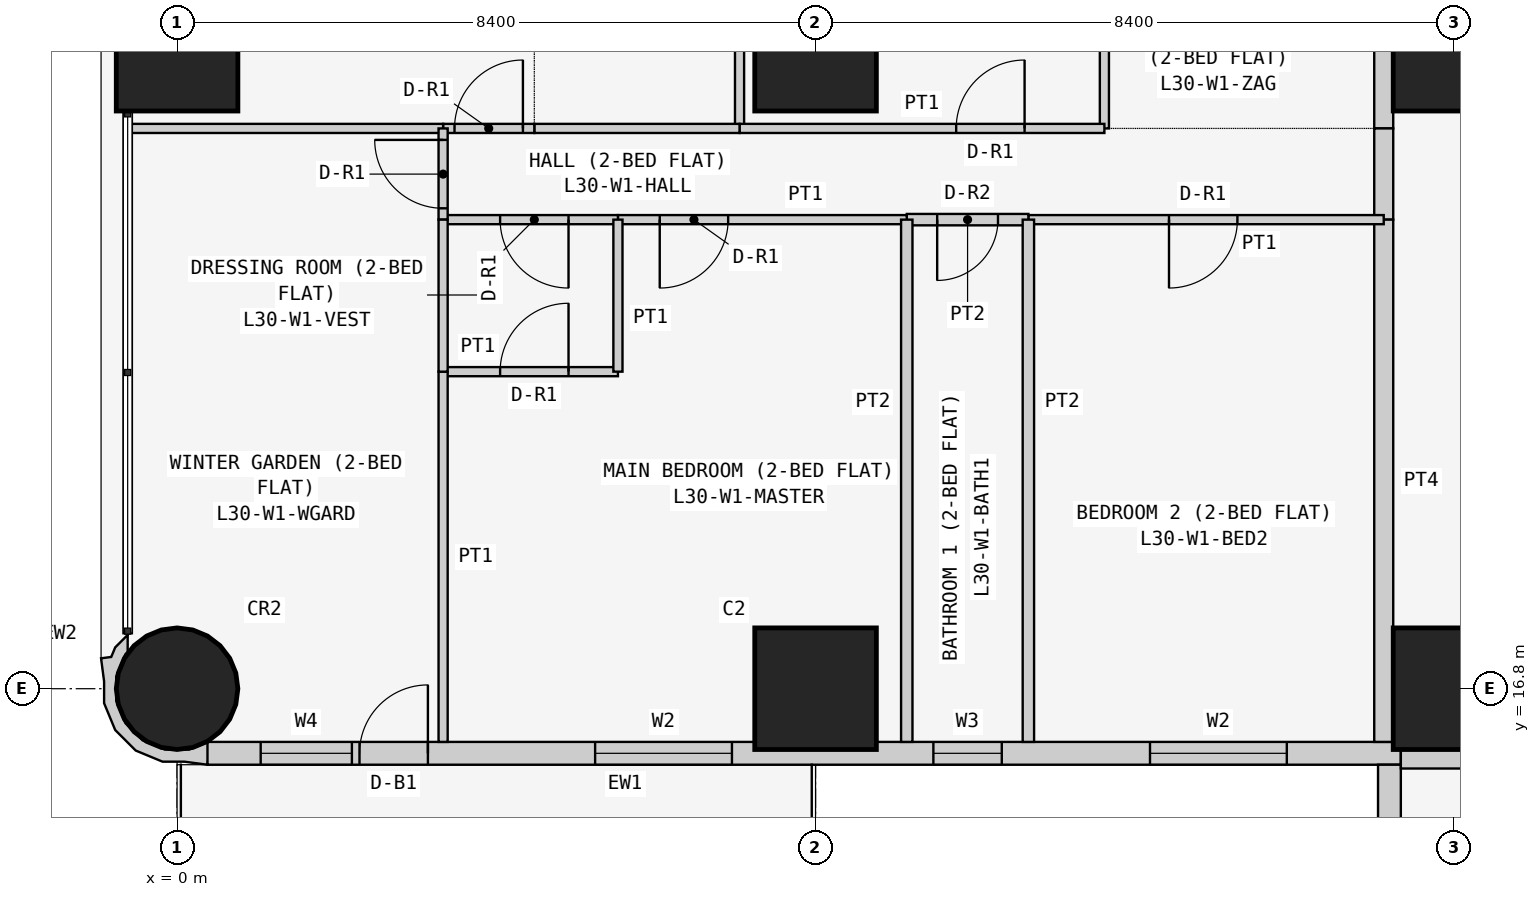
"""IFC4 building model, lengths in metres.
Left out: names, types, materials, properties, quantities, classifications, styles, units other than length and angle.
Written with IfcOpenShell. Run it as: python <this file> out.ifc"""

import sys

from ifc_helpers import new_model, si_unit, direction, frame, frame_2d, origin, origin_2d, place, context, subcontext, project, spatial, polyline, rectangle, circle, outline, extrude, element, fill, save


model = new_model("IFC4")
c1 = context("Model", 3, precision=1e-05, world=origin(), true_north=direction((0.0, 1.0)))
c2 = subcontext(c1, "Body", "Model", "MODEL_VIEW")
j1 = project(units=[si_unit("LENGTHUNIT", "METRE"), si_unit("PLANEANGLEUNIT", "RADIAN")], contexts=[c1])
p1 = place(None, origin())
s1 = spatial("IfcSite", under=j1, at=p1, CompositionType="ELEMENT")
p2 = place(p1, origin())
s2 = spatial("IfcBuilding", under=s1, at=p2, CompositionType="ELEMENT")
p3 = place(p2, frame((0.0, 0.0, 119.7)))
s3 = spatial("IfcBuildingStorey", under=s2, at=p3, CompositionType="ELEMENT", Elevation=119.7)
p4 = place(p3, frame((0.0, 16.8, 0.0), z_axis=(0.0, 0.0, 1.0), x_axis=(1.0, 0.0, 0.0)))
e1 = element("IfcColumn", 1, at=p4, inside=s3, PredefinedType="COLUMN", context=c2, shape_type="SweptSolid", body=[
    extrude(circle(Radius=0.8, at=origin_2d()), origin(), (0.0, 0.0, 1.0), 3.6),
])
for number, where, z_axis, x_axis in (
    (2, (0.0, 25.2, 0.0), (0.0, 0.0, 1.0), (1.0, 0.0, 0.0)),
    (3, (8.4, 16.8, 0.0), (0.0, 0.0, 1.0), (1.0, 0.0, 0.0)),
    (4, (8.4, 25.2, 0.0), (0.0, 0.0, 1.0), (1.0, 0.0, 0.0)),
    (5, (16.8, 16.8, 0.0), (0.0, 0.0, 1.0), (1.0, 0.0, 0.0)),
    (6, (16.8, 25.2, 0.0), (0.0, 0.0, 1.0), (1.0, 0.0, 0.0)),
):
    element("IfcColumn", number, at=place(p3, frame(where, z_axis=z_axis, x_axis=x_axis)), inside=s3, PredefinedType="COLUMN", context=c2, shape_type="SweptSolid", body=[
        extrude(rectangle(XDim=1.6, YDim=1.6, at=origin_2d()), origin(), (0.0, 0.0, 1.0), 3.6),
    ])
p5 = place(p3, frame((0.4, 15.95, 0.0), z_axis=(0.0, 0.0, 1.0), x_axis=(1.0, 0.0, 0.0)))
e7 = element("IfcWall", 7, at=p5, inside=s3, PredefinedType="SOLIDWALL", context=c2, shape_type="SweptSolid", body=[
    extrude(rectangle(XDim=15.7, YDim=0.3, at=frame_2d((7.85, 0.0))), origin(), (0.0, 0.0, 1.0), 3.45),
])
p6 = place(p5, frame((12.4, 0.0, 0.9)))
e8 = element("IfcOpeningElement", 8, at=p6, cuts=e7, PredefinedType="OPENING", context=c2, shape_type="SweptSolid", body=[
    extrude(rectangle(XDim=1.8, YDim=1.5, at=frame_2d((0.9, 0.75))), frame((0.0, 0.16, 0.0), z_axis=(0.0, -1.0, 0.0), x_axis=(1.0, 0.0, 0.0)), (0.0, 0.0, 1.0), 0.32),
])
p7 = place(p5, frame((9.55, 0.0, 1.5)))
e9 = element("IfcOpeningElement", 9, at=p7, cuts=e7, PredefinedType="OPENING", context=c2, shape_type="SweptSolid", body=[
    extrude(rectangle(XDim=0.9, YDim=0.7, at=frame_2d((0.45, 0.35))), frame((0.0, 0.16, 0.0), z_axis=(0.0, -1.0, 0.0), x_axis=(1.0, 0.0, 0.0)), (0.0, 0.0, 1.0), 0.32),
])
p8 = place(p5, frame((5.1, 0.0, 0.9)))
e10 = element("IfcOpeningElement", 10, at=p8, cuts=e7, PredefinedType="OPENING", context=c2, shape_type="SweptSolid", body=[
    extrude(rectangle(XDim=1.8, YDim=1.5, at=frame_2d((0.9, 0.75))), frame((0.0, 0.16, 0.0), z_axis=(0.0, -1.0, 0.0), x_axis=(1.0, 0.0, 0.0)), (0.0, 0.0, 1.0), 0.32),
])
p9 = place(p5, frame((2.0, 0.0, 0.0)))
e11 = element("IfcOpeningElement", 11, at=p9, cuts=e7, PredefinedType="OPENING", context=c2, shape_type="SweptSolid", body=[
    extrude(rectangle(XDim=0.9, YDim=2.4, at=frame_2d((0.45, 1.2))), frame((0.0, 0.16, 0.0), z_axis=(0.0, -1.0, 0.0), x_axis=(1.0, 0.0, 0.0)), (0.0, 0.0, 1.0), 0.32),
])
p10 = place(p5, frame((0.7, 0.0, 0.9)))
e12 = element("IfcOpeningElement", 12, at=p10, cuts=e7, PredefinedType="OPENING", context=c2, shape_type="SweptSolid", body=[
    extrude(rectangle(XDim=1.2, YDim=1.5, at=frame_2d((0.6, 0.75))), frame((0.0, 0.16, 0.0), z_axis=(0.0, -1.0, 0.0), x_axis=(1.0, 0.0, 0.0)), (0.0, 0.0, 1.0), 0.32),
])
p11 = place(p3, frame((15.95, 15.8, 0.0), z_axis=(0.0, 0.0, 1.0), x_axis=(0.0, -1.0, 0.0)))
e13 = element("IfcWall", 13, at=p11, inside=s3, PredefinedType="SOLIDWALL", context=c2, shape_type="SweptSolid", body=[
    extrude(rectangle(XDim=7.0, YDim=0.3, at=frame_2d((3.5, 0.0))), origin(), (0.0, 0.0, 1.0), 3.45),
])
p12 = place(p11, frame((1.5, 0.0, 0.9)))
e14 = element("IfcOpeningElement", 14, at=p12, cuts=e13, PredefinedType="OPENING", context=c2, shape_type="SweptSolid", body=[
    extrude(rectangle(XDim=2.4, YDim=1.5, at=frame_2d((1.2, 0.75))), frame((0.0, 0.16, 0.0), z_axis=(0.0, -1.0, 0.0), x_axis=(1.0, 0.0, 0.0)), (0.0, 0.0, 1.0), 0.32),
])
p13 = place(p11, frame((5.05, 0.0, 0.9)))
e15 = element("IfcOpeningElement", 15, at=p13, cuts=e13, PredefinedType="OPENING", context=c2, shape_type="SweptSolid", body=[
    extrude(rectangle(XDim=1.2, YDim=1.5, at=frame_2d((0.6, 0.75))), frame((0.0, 0.16, 0.0), z_axis=(0.0, -1.0, 0.0), x_axis=(1.0, 0.0, 0.0)), (0.0, 0.0, 1.0), 0.32),
])
p14 = place(p3, frame((-0.595, 17.448, 0.0), z_axis=(0.0, 0.0, 1.0), x_axis=(-0.93923434088, -0.343276641956, 0.0)))
e16 = element("IfcWall", 16, at=p14, inside=s3, PredefinedType="SOLIDWALL", context=c2, shape_type="SweptSolid", body=[
    extrude(outline(polyline([(-0.369, 1.89), (-0.509, 1.621), (-0.491, 1.614), (-0.479, 1.609), (-0.211, 1.62), (0.088, 1.511), (0.323, 1.295), (0.457, 1.006), (0.47, 0.688), (0.361, 0.389), (0.146, 0.154), (0.108, 0.137), (0.031, -0.075), (0.241, 0.023), (0.334, 0.124), (0.465, 0.094), (0.532, 0.393), (0.631, 0.663), (0.614, 1.045), (0.453, 1.391), (0.172, 1.649), (-0.098, 1.748), (-0.369, 1.89)])), origin(), (0.0, 0.0, 1.0), 3.45),
])
p15 = place(p3, frame((22.971, 15.875, 0.0), z_axis=(0.0, 0.0, 1.0), x_axis=(-1.0, 0.0, 0.0)))
e17 = element("IfcWall", 17, at=p15, inside=s3, PredefinedType="PARTITIONING", context=c2, shape_type="SweptSolid", body=[
    extrude(rectangle(XDim=6.871, YDim=0.25, at=frame_2d((3.436, 0.0))), origin(), (0.0, 0.0, 1.0), 3.45),
])
p16 = place(p3, frame((15.875, 24.171, 0.0), z_axis=(0.0, 0.0, 1.0), x_axis=(0.0, 1.0, 0.0)))
e18 = element("IfcWall", 18, at=p16, inside=s3, PredefinedType="PARTITIONING", context=c2, shape_type="SweptSolid", body=[
    extrude(rectangle(XDim=5.229, YDim=0.25, at=frame_2d((2.615, 0.0))), origin(), (0.0, 0.0, 1.0), 3.45),
])
p17 = place(p16, frame((2.129, 0.0, 0.0)))
e19 = element("IfcOpeningElement", 19, at=p17, cuts=e18, PredefinedType="OPENING", context=c2, shape_type="SweptSolid", body=[
    extrude(rectangle(XDim=1.0, YDim=2.1, at=frame_2d((0.5, 1.05))), frame((0.0, 0.135, 0.0), z_axis=(0.0, -1.0, 0.0), x_axis=(1.0, 0.0, 0.0)), (0.0, 0.0, 1.0), 0.27),
])
p18 = place(p3, frame((15.875, 22.971, 0.0), z_axis=(0.0, 0.0, 1.0), x_axis=(0.0, 1.0, 0.0)))
e20 = element("IfcWall", 20, at=p18, inside=s3, PredefinedType="PARTITIONING", context=c2, shape_type="SweptSolid", body=[
    extrude(rectangle(XDim=1.2, YDim=0.25, at=frame_2d((0.6, 0.0))), origin(), (0.0, 0.0, 1.0), 3.45),
])
p19 = place(p3, frame((15.875, 16.1, 0.0), z_axis=(0.0, 0.0, 1.0), x_axis=(0.0, 1.0, 0.0)))
e21 = element("IfcWall", 21, at=p19, inside=s3, PredefinedType="PARTITIONING", context=c2, shape_type="SweptSolid", body=[
    extrude(rectangle(XDim=6.871, YDim=0.25, at=frame_2d((3.436, 0.0))), origin(), (0.0, 0.0, 1.0), 3.45),
])
for number, where, z_axis, x_axis in (
    (22, (12.2, 29.4, 0.0), (0.0, 0.0, 1.0), (0.0, -1.0, 0.0)),
    (23, (7.4, 29.4, 0.0), (0.0, 0.0, 1.0), (0.0, -1.0, 0.0)),
):
    element("IfcWall", number, at=place(p3, frame(where, z_axis=z_axis, x_axis=x_axis)), inside=s3, PredefinedType="PARTITIONING", context=c2, shape_type="SweptSolid", body=[
        extrude(rectangle(XDim=5.229, YDim=0.12, at=frame_2d((2.615, 0.0))), origin(), (0.0, 0.0, 1.0), 3.45),
    ])
p20 = place(p3, frame((7.4, 24.171, 0.0), z_axis=(0.0, 0.0, 1.0), x_axis=(1.0, 0.0, 0.0)))
e24 = element("IfcWall", 24, at=p20, inside=s3, PredefinedType="PARTITIONING", context=c2, shape_type="SweptSolid", body=[
    extrude(rectangle(XDim=4.8, YDim=0.12, at=frame_2d((2.4, 0.0))), origin(), (0.0, 0.0, 1.0), 3.45),
])
p21 = place(p20, frame((2.85, 0.0, 0.0)))
e25 = element("IfcOpeningElement", 25, at=p21, cuts=e24, PredefinedType="OPENING", context=c2, shape_type="SweptSolid", body=[
    extrude(rectangle(XDim=0.9, YDim=2.1, at=frame_2d((0.45, 1.05))), frame((0.0, 0.07, 0.0), z_axis=(0.0, -1.0, 0.0), x_axis=(1.0, 0.0, 0.0)), (0.0, 0.0, 1.0), 0.14),
])
p22 = place(p3, frame((4.7, 24.171, 0.0), z_axis=(0.0, 0.0, 1.0), x_axis=(1.0, 0.0, 0.0)))
e26 = element("IfcWall", 26, at=p22, inside=s3, PredefinedType="PARTITIONING", context=c2, shape_type="SweptSolid", body=[
    extrude(rectangle(XDim=2.7, YDim=0.12, at=frame_2d((1.35, 0.0))), origin(), (0.0, 0.0, 1.0), 3.45),
])
p23 = place(p3, frame((3.5, 24.171, 0.0), z_axis=(0.0, 0.0, 1.0), x_axis=(1.0, 0.0, 0.0)))
e27 = element("IfcWall", 27, at=p23, inside=s3, PredefinedType="PARTITIONING", context=c2, shape_type="SweptSolid", body=[
    extrude(rectangle(XDim=1.2, YDim=0.12, at=frame_2d((0.6, 0.0))), origin(), (0.0, 0.0, 1.0), 3.45),
])
p24 = place(p23, frame((0.15, 0.0, 0.0)))
e28 = element("IfcOpeningElement", 28, at=p24, cuts=e27, PredefinedType="OPENING", context=c2, shape_type="SweptSolid", body=[
    extrude(rectangle(XDim=0.9, YDim=2.1, at=frame_2d((0.45, 1.05))), frame((0.0, 0.07, 0.0), z_axis=(0.0, -1.0, 0.0), x_axis=(1.0, 0.0, 0.0)), (0.0, 0.0, 1.0), 0.14),
])
p25 = place(p3, frame((-0.65, 24.171, 0.0), z_axis=(0.0, 0.0, 1.0), x_axis=(1.0, 0.0, 0.0)))
e29 = element("IfcWall", 29, at=p25, inside=s3, PredefinedType="PARTITIONING", context=c2, shape_type="SweptSolid", body=[
    extrude(rectangle(XDim=4.15, YDim=0.12, at=frame_2d((2.075, 0.0))), origin(), (0.0, 0.0, 1.0), 3.45),
])
p26 = place(p3, frame((11.2, 22.971, 0.0), z_axis=(0.0, 0.0, 1.0), x_axis=(1.0, 0.0, 0.0)))
e30 = element("IfcWall", 30, at=p26, inside=s3, PredefinedType="PARTITIONING", context=c2, shape_type="SweptSolid", body=[
    extrude(rectangle(XDim=4.675, YDim=0.12, at=frame_2d((2.337, 0.0))), origin(), (0.0, 0.0, 1.0), 3.45),
])
p27 = place(p26, frame((1.85, 0.0, 0.0)))
e31 = element("IfcOpeningElement", 31, at=p27, cuts=e30, PredefinedType="OPENING", context=c2, shape_type="SweptSolid", body=[
    extrude(rectangle(XDim=0.9, YDim=2.1, at=frame_2d((0.45, 1.05))), frame((0.0, 0.07, 0.0), z_axis=(0.0, -1.0, 0.0), x_axis=(1.0, 0.0, 0.0)), (0.0, 0.0, 1.0), 0.14),
])
p28 = place(p3, frame((9.6, 22.971, 0.0), z_axis=(0.0, 0.0, 1.0), x_axis=(1.0, 0.0, 0.0)))
e32 = element("IfcWall", 32, at=p28, inside=s3, PredefinedType="PARTITIONING", context=c2, shape_type="SweptSolid", body=[
    extrude(rectangle(XDim=1.6, YDim=0.15, at=frame_2d((0.8, 0.0))), origin(), (0.0, 0.0, 1.0), 3.45),
])
p29 = place(p28, frame((0.4, 0.0, 0.0)))
e33 = element("IfcOpeningElement", 33, at=p29, cuts=e32, PredefinedType="OPENING", context=c2, shape_type="SweptSolid", body=[
    extrude(rectangle(XDim=0.8, YDim=2.1, at=frame_2d((0.4, 1.05))), frame((0.0, 0.085, 0.0), z_axis=(0.0, -1.0, 0.0), x_axis=(1.0, 0.0, 0.0)), (0.0, 0.0, 1.0), 0.17),
])
p30 = place(p3, frame((5.8, 22.971, 0.0), z_axis=(0.0, 0.0, 1.0), x_axis=(1.0, 0.0, 0.0)))
e34 = element("IfcWall", 34, at=p30, inside=s3, PredefinedType="PARTITIONING", context=c2, shape_type="SweptSolid", body=[
    extrude(rectangle(XDim=3.8, YDim=0.12, at=frame_2d((1.9, 0.0))), origin(), (0.0, 0.0, 1.0), 3.45),
])
p31 = place(p30, frame((0.55, 0.0, 0.0)))
e35 = element("IfcOpeningElement", 35, at=p31, cuts=e34, PredefinedType="OPENING", context=c2, shape_type="SweptSolid", body=[
    extrude(rectangle(XDim=0.9, YDim=2.1, at=frame_2d((0.45, 1.05))), frame((0.0, 0.07, 0.0), z_axis=(0.0, -1.0, 0.0), x_axis=(1.0, 0.0, 0.0)), (0.0, 0.0, 1.0), 0.14),
])
p32 = place(p3, frame((3.5, 22.971, 0.0), z_axis=(0.0, 0.0, 1.0), x_axis=(1.0, 0.0, 0.0)))
e36 = element("IfcWall", 36, at=p32, inside=s3, PredefinedType="PARTITIONING", context=c2, shape_type="SweptSolid", body=[
    extrude(rectangle(XDim=2.3, YDim=0.12, at=frame_2d((1.15, 0.0))), origin(), (0.0, 0.0, 1.0), 3.45),
])
p33 = place(p32, frame((0.75, 0.0, 0.0)))
e37 = element("IfcOpeningElement", 37, at=p33, cuts=e36, PredefinedType="OPENING", context=c2, shape_type="SweptSolid", body=[
    extrude(rectangle(XDim=0.9, YDim=2.1, at=frame_2d((0.45, 1.05))), frame((0.0, 0.07, 0.0), z_axis=(0.0, -1.0, 0.0), x_axis=(1.0, 0.0, 0.0)), (0.0, 0.0, 1.0), 0.14),
])
p34 = place(p3, frame((3.5, 24.171, 0.0), z_axis=(0.0, 0.0, 1.0), x_axis=(0.0, -1.0, 0.0)))
e38 = element("IfcWall", 38, at=p34, inside=s3, PredefinedType="PARTITIONING", context=c2, shape_type="SweptSolid", body=[
    extrude(rectangle(XDim=1.2, YDim=0.12, at=frame_2d((0.6, 0.0))), origin(), (0.0, 0.0, 1.0), 3.45),
])
p35 = place(p34, frame((0.151, 0.0, 0.0)))
e39 = element("IfcOpeningElement", 39, at=p35, cuts=e38, PredefinedType="OPENING", context=c2, shape_type="SweptSolid", body=[
    extrude(rectangle(XDim=0.9, YDim=2.1, at=frame_2d((0.45, 1.05))), frame((0.0, 0.07, 0.0), z_axis=(0.0, -1.0, 0.0), x_axis=(1.0, 0.0, 0.0)), (0.0, 0.0, 1.0), 0.14),
])
for number, where, z_axis, x_axis in (
    (40, (11.2, 22.971, 0.0), (0.0, 0.0, 1.0), (0.0, -1.0, 0.0)),
    (41, (9.6, 22.971, 0.0), (0.0, 0.0, 1.0), (0.0, -1.0, 0.0)),
):
    element("IfcWall", number, at=place(p3, frame(where, z_axis=z_axis, x_axis=x_axis)), inside=s3, PredefinedType="PARTITIONING", context=c2, shape_type="SweptSolid", body=[
        extrude(rectangle(XDim=6.871, YDim=0.15, at=frame_2d((3.436, 0.0))), origin(), (0.0, 0.0, 1.0), 3.45),
    ])
p36 = place(p3, frame((3.5, 20.971, 0.0), z_axis=(0.0, 0.0, 1.0), x_axis=(1.0, 0.0, 0.0)))
e42 = element("IfcWall", 42, at=p36, inside=s3, PredefinedType="PARTITIONING", context=c2, shape_type="SweptSolid", body=[
    extrude(rectangle(XDim=2.3, YDim=0.12, at=frame_2d((1.15, 0.0))), origin(), (0.0, 0.0, 1.0), 3.45),
])
p37 = place(p36, frame((0.75, 0.0, 0.0)))
e43 = element("IfcOpeningElement", 43, at=p37, cuts=e42, PredefinedType="OPENING", context=c2, shape_type="SweptSolid", body=[
    extrude(rectangle(XDim=0.9, YDim=2.1, at=frame_2d((0.45, 1.05))), frame((0.0, 0.07, 0.0), z_axis=(0.0, -1.0, 0.0), x_axis=(1.0, 0.0, 0.0)), (0.0, 0.0, 1.0), 0.14),
])
p38 = place(p3, frame((5.8, 20.971, 0.0), z_axis=(0.0, 0.0, 1.0), x_axis=(0.0, 1.0, 0.0)))
e44 = element("IfcWall", 44, at=p38, inside=s3, PredefinedType="PARTITIONING", context=c2, shape_type="SweptSolid", body=[
    extrude(rectangle(XDim=2.0, YDim=0.12, at=frame_2d((1.0, 0.0))), origin(), (0.0, 0.0, 1.0), 3.45),
])
p39 = place(p3, frame((3.5, 16.1, 0.0), z_axis=(0.0, 0.0, 1.0), x_axis=(0.0, 1.0, 0.0)))
e45 = element("IfcWall", 45, at=p39, inside=s3, PredefinedType="PARTITIONING", context=c2, shape_type="SweptSolid", body=[
    extrude(rectangle(XDim=4.871, YDim=0.12, at=frame_2d((2.436, 0.0))), origin(), (0.0, 0.0, 1.0), 3.45),
])
p40 = place(p3, frame((3.5, 22.971, 0.0), z_axis=(0.0, 0.0, 1.0), x_axis=(0.0, -1.0, 0.0)))
e46 = element("IfcWall", 46, at=p40, inside=s3, PredefinedType="PARTITIONING", context=c2, shape_type="SweptSolid", body=[
    extrude(rectangle(XDim=2.0, YDim=0.12, at=frame_2d((1.0, 0.0))), origin(), (0.0, 0.0, 1.0), 3.45),
])
p41 = place(p6, origin())
e47 = element("IfcWindow", 47, at=p41, inside=s3, PartitioningType="SINGLE_PANEL", PredefinedType="WINDOW", context=c2, shape_type="SweptSolid", body=[
    extrude(rectangle(XDim=1.8, YDim=1.5, at=frame_2d((0.9, 0.75))), frame((0.0, 0.03, 0.0), z_axis=(0.0, -1.0, 0.0), x_axis=(1.0, 0.0, 0.0)), (0.0, 0.0, 1.0), 0.06),
])
fill(e8, e47)
p42 = place(p7, origin())
e48 = element("IfcWindow", 48, at=p42, inside=s3, PartitioningType="SINGLE_PANEL", PredefinedType="WINDOW", context=c2, shape_type="SweptSolid", body=[
    extrude(rectangle(XDim=0.9, YDim=0.7, at=frame_2d((0.45, 0.35))), frame((0.0, 0.03, 0.0), z_axis=(0.0, -1.0, 0.0), x_axis=(1.0, 0.0, 0.0)), (0.0, 0.0, 1.0), 0.06),
])
fill(e9, e48)
p43 = place(p8, origin())
e49 = element("IfcWindow", 49, at=p43, inside=s3, PartitioningType="SINGLE_PANEL", PredefinedType="WINDOW", context=c2, shape_type="SweptSolid", body=[
    extrude(rectangle(XDim=1.8, YDim=1.5, at=frame_2d((0.9, 0.75))), frame((0.0, 0.03, 0.0), z_axis=(0.0, -1.0, 0.0), x_axis=(1.0, 0.0, 0.0)), (0.0, 0.0, 1.0), 0.06),
])
fill(e10, e49)
p44 = place(p9, origin())
e50 = element("IfcDoor", 50, at=p44, inside=s3, OperationType="SINGLE_SWING_RIGHT", PredefinedType="DOOR", context=c2, shape_type="SweptSolid", body=[
    extrude(rectangle(XDim=0.9, YDim=2.4, at=frame_2d((0.45, 1.2))), frame((0.0, 0.025, 0.0), z_axis=(0.0, -1.0, 0.0), x_axis=(1.0, 0.0, 0.0)), (0.0, 0.0, 1.0), 0.05),
])
fill(e11, e50)
p45 = place(p10, origin())
e51 = element("IfcWindow", 51, at=p45, inside=s3, PartitioningType="SINGLE_PANEL", PredefinedType="WINDOW", context=c2, shape_type="SweptSolid", body=[
    extrude(rectangle(XDim=1.2, YDim=1.5, at=frame_2d((0.6, 0.75))), frame((0.0, 0.03, 0.0), z_axis=(0.0, -1.0, 0.0), x_axis=(1.0, 0.0, 0.0)), (0.0, 0.0, 1.0), 0.06),
])
fill(e12, e51)
p46 = place(p21, origin())
e52 = element("IfcDoor", 52, at=p46, inside=s3, OperationType="SINGLE_SWING_RIGHT", PredefinedType="DOOR", context=c2, shape_type="SweptSolid", body=[
    extrude(rectangle(XDim=0.9, YDim=2.1, at=frame_2d((0.45, 1.05))), frame((0.0, 0.025, 0.0), z_axis=(0.0, -1.0, 0.0), x_axis=(1.0, 0.0, 0.0)), (0.0, 0.0, 1.0), 0.05),
])
fill(e25, e52)
p47 = place(p24, origin())
e53 = element("IfcDoor", 53, at=p47, inside=s3, OperationType="SINGLE_SWING_RIGHT", PredefinedType="DOOR", context=c2, shape_type="SweptSolid", body=[
    extrude(rectangle(XDim=0.9, YDim=2.1, at=frame_2d((0.45, 1.05))), frame((0.0, 0.025, 0.0), z_axis=(0.0, -1.0, 0.0), x_axis=(1.0, 0.0, 0.0)), (0.0, 0.0, 1.0), 0.05),
])
fill(e28, e53)
p48 = place(p27, frame((0.9, 0.0, 0.0), z_axis=(0.0, 0.0, 1.0), x_axis=(-1.0, 0.0, 0.0)))
e54 = element("IfcDoor", 54, at=p48, inside=s3, OperationType="SINGLE_SWING_RIGHT", PredefinedType="DOOR", context=c2, shape_type="SweptSolid", body=[
    extrude(rectangle(XDim=0.9, YDim=2.1, at=frame_2d((0.45, 1.05))), frame((0.0, 0.025, 0.0), z_axis=(0.0, -1.0, 0.0), x_axis=(1.0, 0.0, 0.0)), (0.0, 0.0, 1.0), 0.05),
])
fill(e31, e54)
p49 = place(p29, frame((0.8, 0.0, 0.0), z_axis=(0.0, 0.0, 1.0), x_axis=(-1.0, 0.0, 0.0)))
e55 = element("IfcDoor", 55, at=p49, inside=s3, OperationType="SINGLE_SWING_RIGHT", PredefinedType="DOOR", context=c2, shape_type="SweptSolid", body=[
    extrude(rectangle(XDim=0.8, YDim=2.1, at=frame_2d((0.4, 1.05))), frame((0.0, 0.025, 0.0), z_axis=(0.0, -1.0, 0.0), x_axis=(1.0, 0.0, 0.0)), (0.0, 0.0, 1.0), 0.05),
])
fill(e33, e55)
p50 = place(p31, frame((0.9, 0.0, 0.0), z_axis=(0.0, 0.0, 1.0), x_axis=(-1.0, 0.0, 0.0)))
e56 = element("IfcDoor", 56, at=p50, inside=s3, OperationType="SINGLE_SWING_RIGHT", PredefinedType="DOOR", context=c2, shape_type="SweptSolid", body=[
    extrude(rectangle(XDim=0.9, YDim=2.1, at=frame_2d((0.45, 1.05))), frame((0.0, 0.025, 0.0), z_axis=(0.0, -1.0, 0.0), x_axis=(1.0, 0.0, 0.0)), (0.0, 0.0, 1.0), 0.05),
])
fill(e35, e56)
p51 = place(p33, frame((0.9, 0.0, 0.0), z_axis=(0.0, 0.0, 1.0), x_axis=(-1.0, 0.0, 0.0)))
e57 = element("IfcDoor", 57, at=p51, inside=s3, OperationType="SINGLE_SWING_LEFT", PredefinedType="DOOR", context=c2, shape_type="SweptSolid", body=[
    extrude(rectangle(XDim=0.9, YDim=2.1, at=frame_2d((0.45, 1.05))), frame((0.0, 0.025, 0.0), z_axis=(0.0, -1.0, 0.0), x_axis=(1.0, 0.0, 0.0)), (0.0, 0.0, 1.0), 0.05),
])
fill(e37, e57)
p52 = place(p37, origin())
e58 = element("IfcDoor", 58, at=p52, inside=s3, OperationType="SINGLE_SWING_RIGHT", PredefinedType="DOOR", context=c2, shape_type="SweptSolid", body=[
    extrude(rectangle(XDim=0.9, YDim=2.1, at=frame_2d((0.45, 1.05))), frame((0.0, 0.025, 0.0), z_axis=(0.0, -1.0, 0.0), x_axis=(1.0, 0.0, 0.0)), (0.0, 0.0, 1.0), 0.05),
])
fill(e43, e58)
p53 = place(p35, frame((0.9, 0.0, 0.0), z_axis=(0.0, 0.0, 1.0), x_axis=(-1.0, 0.0, 0.0)))
e59 = element("IfcDoor", 59, at=p53, inside=s3, OperationType="SINGLE_SWING_RIGHT", PredefinedType="DOOR", context=c2, shape_type="SweptSolid", body=[
    extrude(rectangle(XDim=0.9, YDim=2.1, at=frame_2d((0.45, 1.05))), frame((0.0, 0.025, 0.0), z_axis=(0.0, -1.0, 0.0), x_axis=(1.0, 0.0, 0.0)), (0.0, 0.0, 1.0), 0.05),
])
fill(e39, e59)
save(model, sys.argv[1])
